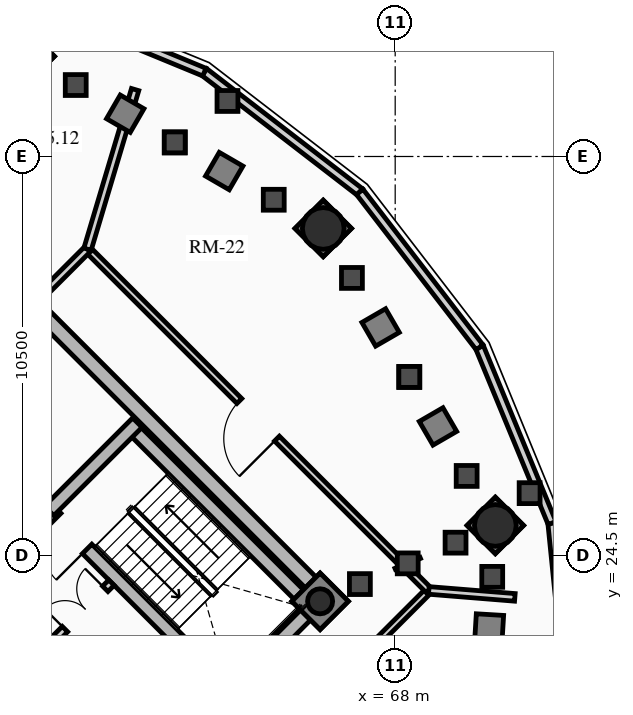
"""IFC4 building model, lengths in metres.
Left out: names, types, materials, properties, quantities, classifications, styles, units other than length and angle.
Written with IfcOpenShell. Run it as: python <this file> out.ifc"""

import sys

from ifc_helpers import new_model, si_unit, direction, frame, frame_2d, origin, origin_2d, place, context, subcontext, project, spatial, rectangle, circle, hollow_circle, extrude, source, transform, mapped, element, fill, save


model = new_model("IFC4")
c1 = context("Model", 3, precision=1e-05, world=origin(), true_north=direction((0.0, 1.0)))
c2 = subcontext(c1, "Body", "Model", "MODEL_VIEW")
j1 = project(units=[si_unit("LENGTHUNIT", "METRE"), si_unit("PLANEANGLEUNIT", "RADIAN")], contexts=[c1])
p1 = place(None, origin())
s1 = spatial("IfcSite", under=j1, at=p1, CompositionType="ELEMENT")
p2 = place(p1, origin())
s2 = spatial("IfcBuilding", under=s1, at=p2, CompositionType="ELEMENT")
p3 = place(p2, frame((0.0, 0.0, 192.34)))
s3 = spatial("IfcBuildingStorey", under=s2, at=p3, CompositionType="ELEMENT", Elevation=192.34)
p4 = place(p3, frame((66.268, 23.298, 0.0), z_axis=(0.0, 0.0, 1.0), x_axis=(-0.707106781187, 0.707106781187, 0.0)))
e1 = element("IfcWall", 1, at=p4, inside=s3, PredefinedType="SHEAR", context=c2, shape_type="SweptSolid", body=[
    extrude(rectangle(XDim=14.1, YDim=0.4, at=frame_2d((7.05, 0.0))), origin(), (0.0, 0.0, 1.0), 4.32),
])
p5 = place(p3, frame((58.561, 15.873, 0.0), z_axis=(0.0, 0.0, 1.0), x_axis=(0.707106781187, 0.707106781187, 0.0)))
e2 = element("IfcWall", 2, at=p5, inside=s3, PredefinedType="SHEAR", context=c2, shape_type="SweptSolid", body=[
    extrude(rectangle(XDim=10.7, YDim=0.4, at=frame_2d((5.35, 0.0))), origin(), (0.0, 0.0, 1.0), 4.32),
])
m1 = source(origin(), c2, "Body", "SweptSolid", [
    extrude(rectangle(XDim=1.5, YDim=2.02, at=frame_2d((0.75, 1.01))), frame((0.0, 0.21, 0.0), z_axis=(0.0, -1.0, 0.0), x_axis=(1.0, 0.0, 0.0)), (0.0, 0.0, 1.0), 0.42),
])
p6 = place(p5, frame((5.45, 0.0, 0.0)))
e3 = element("IfcOpeningElement", 3, at=p6, cuts=e2, PredefinedType="OPENING", context=c2, shape_type="MappedRepresentation", body=[
    mapped(m1, transform((0.0, 0.0, 0.0), x_axis=(1.0, 0.0, 0.0), y_axis=(0.0, 1.0, 0.0), z_axis=(0.0, 0.0, 1.0), scale=1.0)),
])
p7 = place(p3, frame((61.06, 18.373, 0.0), z_axis=(0.0, 0.0, 1.0), x_axis=(-0.707106781187, 0.707106781187, 0.0)))
e4 = element("IfcWall", 4, at=p7, inside=s3, PredefinedType="SHEAR", context=c2, shape_type="SweptSolid", body=[
    extrude(rectangle(XDim=13.7, YDim=0.35, at=frame_2d((6.85, 0.0))), origin(), (0.0, 0.0, 1.0), 4.32),
])
m2 = source(origin(), c2, "Body", "SweptSolid", [
    extrude(rectangle(XDim=1.1, YDim=2.015, at=frame_2d((0.55, 1.007))), frame((0.0, 0.185, 0.0), z_axis=(0.0, -1.0, 0.0), x_axis=(1.0, 0.0, 0.0)), (0.0, 0.0, 1.0), 0.37),
])
p8 = place(p7, frame((4.85, 0.0, 0.0)))
e5 = element("IfcOpeningElement", 5, at=p8, cuts=e4, PredefinedType="OPENING", context=c2, shape_type="MappedRepresentation", body=[
    mapped(m2, transform((0.0, 0.0, 0.0), x_axis=(1.0, 0.0, 0.0), y_axis=(0.0, 1.0, 0.0), z_axis=(0.0, 0.0, 1.0), scale=1.0)),
])
m3 = source(origin(), c2, "Body", "SweptSolid", [
    extrude(rectangle(XDim=1.15, YDim=2.02, at=frame_2d((0.575, 1.01))), frame((0.0, 0.185, 0.0), z_axis=(0.0, -1.0, 0.0), x_axis=(1.0, 0.0, 0.0)), (0.0, 0.0, 1.0), 0.37),
])
p9 = place(p7, frame((7.27, 0.0, 0.0)))
e6 = element("IfcOpeningElement", 6, at=p9, cuts=e4, PredefinedType="OPENING", context=c2, shape_type="MappedRepresentation", body=[
    mapped(m3, transform((0.0, 0.0, 0.0), x_axis=(1.0, 0.0, 0.0), y_axis=(0.0, 1.0, 0.0), z_axis=(0.0, 0.0, 1.0), scale=1.0)),
])
p10 = place(p3, frame((63.627, 20.94, 0.0), z_axis=(0.0, 0.0, 1.0), x_axis=(-0.707119496762, 0.707094065383, 0.0)))
e7 = element("IfcWall", 7, at=p10, inside=s3, PredefinedType="SHEAR", context=c2, shape_type="SweptSolid", body=[
    extrude(rectangle(XDim=9.6, YDim=0.35, at=frame_2d((4.8, 0.0))), origin(), (0.0, 0.0, 1.0), 4.32),
])
p11 = place(p10, frame((5.28, 0.0, 0.0)))
e8 = element("IfcOpeningElement", 8, at=p11, cuts=e7, PredefinedType="OPENING", context=c2, shape_type="MappedRepresentation", body=[
    mapped(m3, transform((0.0, 0.0, 0.0), x_axis=(1.0, 0.0, 0.0), y_axis=(0.0, 1.0, 0.0), z_axis=(0.0, 0.0, 1.0), scale=1.0)),
])
p12 = place(p3, frame((65.812, 23.125, 0.0), z_axis=(0.0, 0.0, 1.0), x_axis=(-0.707106781187, 0.707106781187, 0.0)))
e9 = element("IfcWall", 9, at=p12, inside=s3, PredefinedType="SHEAR", context=c2, shape_type="SweptSolid", body=[
    extrude(rectangle(XDim=6.695, YDim=0.35, at=frame_2d((3.348, 0.0))), origin(), (0.0, 0.0, 1.0), 4.32),
])
p13 = place(p3, frame((58.893, 25.674, 0.0), z_axis=(0.0, 0.0, 1.0), x_axis=(0.707106781187, 0.707106781187, 0.0)))
e10 = element("IfcWall", 10, at=p13, inside=s3, PredefinedType="SHEAR", context=c2, shape_type="SweptSolid", body=[
    extrude(rectangle(XDim=3.285, YDim=0.35, at=frame_2d((1.643, 0.0))), origin(), (0.0, 0.0, 1.0), 4.32),
])
p14 = place(p3, frame((66.024, 23.294, 0.0), z_axis=(0.0, 0.0, 1.0), x_axis=(0.707106781187, 0.707106781187, 0.0)))
e11 = element("IfcColumn", 11, at=p14, inside=s3, PredefinedType="COLUMN", context=c2, shape_type="SweptSolid", body=[
    extrude(hollow_circle(Radius=0.33, WallThickness=0.025, at=origin_2d()), origin(), (0.0, 0.0, 1.0), 4.32),
])
for number, where, z_axis, x_axis in (
    (12, (66.107, 33.107, 0.0), (0.0, 0.0, 1.0), (1.0, 0.0, 0.0)),
    (13, (70.635, 25.291, 0.0), (0.0, 0.0, 1.0), (1.0, 0.0, 0.0)),
):
    element("IfcColumn", number, at=place(p3, frame(where, z_axis=z_axis, x_axis=x_axis)), inside=s3, PredefinedType="USERDEFINED", context=c2, shape_type="SweptSolid", body=[
        extrude(circle(Radius=0.55, at=origin_2d()), origin(), (0.0, 0.0, 1.0), 4.32),
    ])
p15 = place(p3, frame((62.979, 37.22, 0.0), z_axis=(0.0, 0.0, 1.0), x_axis=(0.791962560189, -0.610569654715, 0.0)))
e14 = element("IfcWall", 14, at=p15, inside=s3, PredefinedType="SOLIDWALL", context=c2, shape_type="SweptSolid", body=[
    extrude(rectangle(XDim=5.163, YDim=0.22, at=frame_2d((2.582, 0.0))), origin(), (0.0, 0.0, 1.0), 4.095),
])
p16 = place(p3, frame((58.354, 39.127, 0.0), z_axis=(0.0, 0.0, 1.0), x_axis=(0.924494066201, -0.381196434348, 0.0)))
e15 = element("IfcWall", 15, at=p16, inside=s3, PredefinedType="SOLIDWALL", context=c2, shape_type="SweptSolid", body=[
    extrude(rectangle(XDim=5.003, YDim=0.22, at=frame_2d((2.501, 0.0))), origin(), (0.0, 0.0, 1.0), 4.095),
])
p17 = place(p3, frame((72.127, 25.354, 0.0), z_axis=(0.0, 0.0, 1.0), x_axis=(0.100438356004, -0.994943283129, 0.0)))
e16 = element("IfcWall", 16, at=p17, inside=s3, PredefinedType="SOLIDWALL", context=c2, shape_type="SweptSolid", body=[
    extrude(rectangle(XDim=4.733, YDim=0.22, at=frame_2d((2.366, 0.0))), origin(), (0.0, 0.0, 1.0), 4.095),
])
p18 = place(p3, frame((70.22, 29.979, 0.0), z_axis=(0.0, 0.0, 1.0), x_axis=(0.381196434348, -0.924494066201, 0.0)))
e17 = element("IfcWall", 17, at=p18, inside=s3, PredefinedType="SOLIDWALL", context=c2, shape_type="SweptSolid", body=[
    extrude(rectangle(XDim=5.003, YDim=0.22, at=frame_2d((2.501, 0.0))), origin(), (0.0, 0.0, 1.0), 4.095),
])
p19 = place(p3, frame((67.068, 34.068, 0.0), z_axis=(0.0, 0.0, 1.0), x_axis=(0.610569654715, -0.791962560189, 0.0)))
e18 = element("IfcWall", 18, at=p19, inside=s3, PredefinedType="SOLIDWALL", context=c2, shape_type="SweptSolid", body=[
    extrude(rectangle(XDim=5.163, YDim=0.22, at=frame_2d((2.582, 0.0))), origin(), (0.0, 0.0, 1.0), 4.095),
])
p20 = place(p3, frame((58.214, 21.467, 0.0), z_axis=(0.0, 0.0, 1.0), x_axis=(0.707106781187, 0.707106781187, 0.0)))
e19 = element("IfcWall", 19, at=p20, inside=s3, PredefinedType="PARTITIONING", context=c2, shape_type="SweptSolid", body=[
    extrude(rectangle(XDim=3.28, YDim=0.2, at=frame_2d((1.64, 0.0))), origin(), (0.0, 0.0, 1.0), 4.095),
])
m4 = source(origin(), c2, "Body", "SweptSolid", [
    extrude(rectangle(XDim=1.5, YDim=2.02, at=frame_2d((0.75, 1.01))), frame((0.0, 0.11, 0.0), z_axis=(0.0, -1.0, 0.0), x_axis=(1.0, 0.0, 0.0)), (0.0, 0.0, 1.0), 0.22),
])
p21 = place(p20, frame((1.55, 0.0, 0.0)))
e20 = element("IfcOpeningElement", 20, at=p21, cuts=e19, PredefinedType="OPENING", context=c2, shape_type="MappedRepresentation", body=[
    mapped(m4, transform((0.0, 0.0, 0.0), x_axis=(1.0, 0.0, 0.0), y_axis=(0.0, 1.0, 0.0), z_axis=(0.0, 0.0, 1.0), scale=1.0)),
])
p22 = place(p3, frame((58.419, 13.115, 0.0), z_axis=(0.0, 0.0, 1.0), x_axis=(0.707106781187, 0.707106781187, 0.0)))
e21 = element("IfcWall", 21, at=p22, inside=s3, PredefinedType="PARTITIONING", context=c2, shape_type="SweptSolid", body=[
    extrude(rectangle(XDim=14.8, YDim=0.18, at=frame_2d((7.4, 0.0))), origin(), (0.0, 0.0, 1.0), 3.386),
])
m5 = source(origin(), c2, "Body", "SweptSolid", [
    extrude(rectangle(XDim=1.4, YDim=2.02, at=frame_2d((0.7, 1.01))), frame((0.0, 0.1, 0.0), z_axis=(0.0, -1.0, 0.0), x_axis=(1.0, 0.0, 0.0)), (0.0, 0.0, 1.0), 0.2),
])
p23 = place(p22, frame((6.7, 0.0, 0.0)))
e22 = element("IfcOpeningElement", 22, at=p23, cuts=e21, PredefinedType="OPENING", context=c2, shape_type="MappedRepresentation", body=[
    mapped(m5, transform((0.0, 0.0, 0.0), x_axis=(1.0, 0.0, 0.0), y_axis=(0.0, 1.0, 0.0), z_axis=(0.0, 0.0, 1.0), scale=1.0)),
])
p24 = place(p3, frame((68.885, 23.581, 0.0), z_axis=(0.0, 0.0, 1.0), x_axis=(-0.707106781187, 0.707106781187, 0.0)))
e23 = element("IfcWall", 23, at=p24, inside=s3, PredefinedType="PARTITIONING", context=c2, shape_type="SweptSolid", body=[
    extrude(rectangle(XDim=12.7, YDim=0.18, at=frame_2d((6.35, 0.0))), origin(), (0.0, 0.0, 1.0), 3.386),
])
p25 = place(p24, frame((5.65, 0.0, 0.0)))
e24 = element("IfcOpeningElement", 24, at=p25, cuts=e23, PredefinedType="OPENING", context=c2, shape_type="MappedRepresentation", body=[
    mapped(m5, transform((0.0, 0.0, 0.0), x_axis=(1.0, 0.0, 0.0), y_axis=(0.0, 1.0, 0.0), z_axis=(0.0, 0.0, 1.0), scale=1.0)),
])
p26 = place(p3, frame((58.596, 31.253, 0.0), z_axis=(0.0, 0.0, 1.0), x_axis=(0.707172758026, 0.707040798191, 0.0)))
e25 = element("IfcWall", 25, at=p26, inside=s3, PredefinedType="PARTITIONING", context=c2, shape_type="SweptSolid", body=[
    extrude(rectangle(XDim=1.85, YDim=0.2, at=frame_2d((0.925, 0.0))), origin(), (0.0, 0.0, 1.0), 4.095),
])
p27 = place(p3, frame((59.904, 32.561, 0.0), z_axis=(0.0, 0.0, 1.0), x_axis=(0.285783581439, 0.958294184778, 0.0)))
e26 = element("IfcWall", 26, at=p27, inside=s3, PredefinedType="PARTITIONING", context=c2, shape_type="SweptSolid", body=[
    extrude(rectangle(XDim=4.383, YDim=0.2, at=frame_2d((2.191, 0.0))), origin(), (0.0, 0.0, 1.0), 3.386),
])
p28 = place(p3, frame((68.885, 23.581, 0.0), z_axis=(0.0, 0.0, 1.0), x_axis=(0.996754503146, -0.080501307187, 0.0)))
e27 = element("IfcWall", 27, at=p28, inside=s3, PredefinedType="PARTITIONING", context=c2, shape_type="SweptSolid", body=[
    extrude(rectangle(XDim=2.271, YDim=0.2, at=frame_2d((1.136, 0.0))), origin(), (0.0, 0.0, 1.0), 3.466),
])
m6 = source(origin(), c2, "Body", "SweptSolid", [
    extrude(rectangle(XDim=1.15, YDim=2.02, at=frame_2d((0.575, 1.01))), frame((0.0, 0.025, 0.0), z_axis=(0.0, -1.0, 0.0), x_axis=(1.0, 0.0, 0.0)), (0.0, 0.0, 1.0), 0.05),
])
p29 = place(p11, origin())
e28 = element("IfcDoor", 28, at=p29, inside=s3, OperationType="SINGLE_SWING_LEFT", PredefinedType="DOOR", context=c2, shape_type="MappedRepresentation", body=[
    mapped(m6, transform((0.0, 0.0, 0.0), x_axis=(1.0, 0.0, 0.0), y_axis=(0.0, 1.0, 0.0), z_axis=(0.0, 0.0, 1.0), scale=1.0)),
])
fill(e8, e28)
m7 = source(origin(), c2, "Body", "SweptSolid", [
    extrude(rectangle(XDim=1.5, YDim=2.02, at=frame_2d((0.75, 1.01))), frame((0.0, 0.025, 0.0), z_axis=(0.0, -1.0, 0.0), x_axis=(1.0, 0.0, 0.0)), (0.0, 0.0, 1.0), 0.05),
])
p30 = place(p21, origin())
e29 = element("IfcDoor", 29, at=p30, inside=s3, OperationType="DOUBLE_DOOR_SINGLE_SWING", PredefinedType="DOOR", context=c2, shape_type="MappedRepresentation", body=[
    mapped(m7, transform((0.0, 0.0, 0.0), x_axis=(1.0, 0.0, 0.0), y_axis=(0.0, 1.0, 0.0), z_axis=(0.0, 0.0, 1.0), scale=1.0)),
])
fill(e20, e29)
m8 = source(origin(), c2, "Body", "SweptSolid", [
    extrude(rectangle(XDim=1.4, YDim=2.02, at=frame_2d((0.7, 1.01))), frame((0.0, 0.025, 0.0), z_axis=(0.0, -1.0, 0.0), x_axis=(1.0, 0.0, 0.0)), (0.0, 0.0, 1.0), 0.05),
])
p31 = place(p25, origin())
e30 = element("IfcDoor", 30, at=p31, inside=s3, OperationType="SINGLE_SWING_LEFT", PredefinedType="DOOR", context=c2, shape_type="MappedRepresentation", body=[
    mapped(m8, transform((0.0, 0.0, 0.0), x_axis=(1.0, 0.0, 0.0), y_axis=(0.0, 1.0, 0.0), z_axis=(0.0, 0.0, 1.0), scale=1.0)),
])
fill(e24, e30)
save(model, sys.argv[1])
